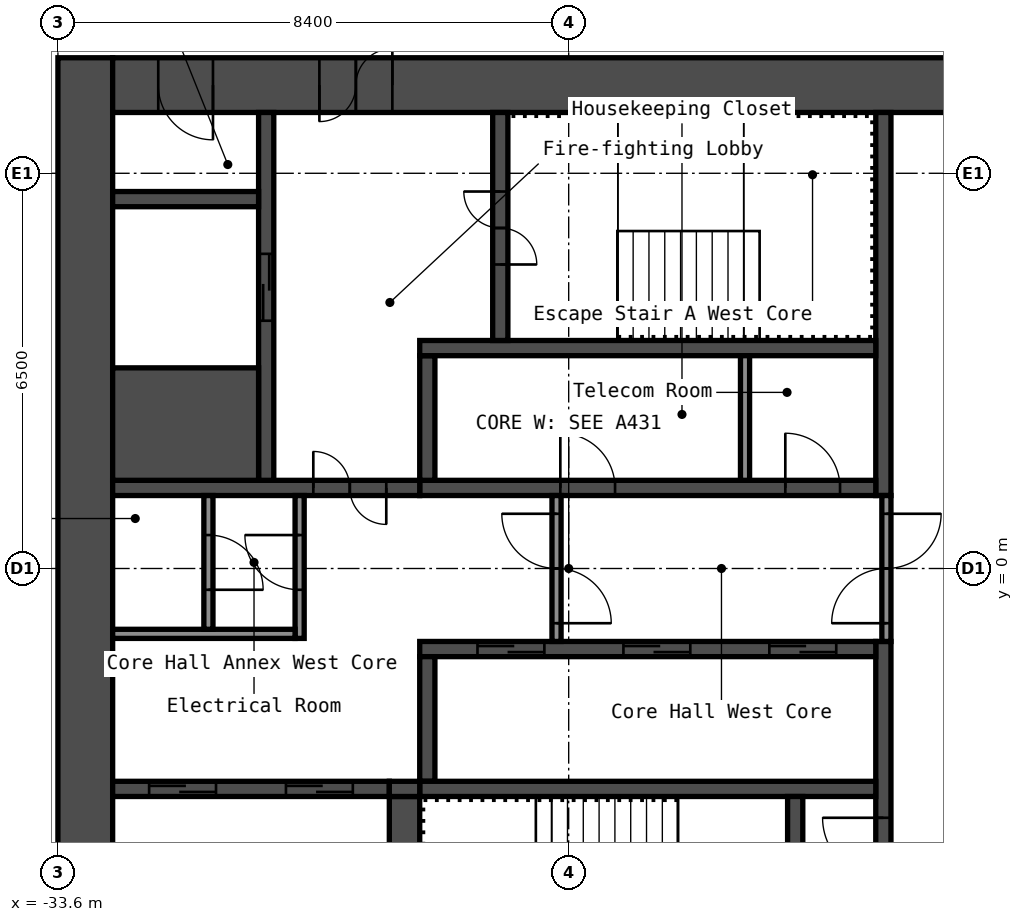
"""IFC4 building model, lengths in metres.
Left out: names, types, materials, properties, quantities, classifications, styles, units other than length and angle.
Written with IfcOpenShell. Run it as: python <this file> out.ifc"""

import sys

from ifc_helpers import new_model, si_unit, direction, frame, frame_2d, origin, place, context, subcontext, project, spatial, rectangle, extrude, element, fill, save


model = new_model("IFC4")
c1 = context("Model", 3, precision=1e-05, world=origin(), true_north=direction((0.0, 1.0)))
c2 = subcontext(c1, "Body", "Model", "MODEL_VIEW")
j1 = project(units=[si_unit("LENGTHUNIT", "METRE"), si_unit("PLANEANGLEUNIT", "RADIAN")], contexts=[c1])
p1 = place(None, origin())
s1 = spatial("IfcSite", under=j1, at=p1, CompositionType="ELEMENT")
p2 = place(p1, origin())
s2 = spatial("IfcBuilding", under=s1, at=p2, CompositionType="ELEMENT")
p3 = place(p2, frame((0.0, 0.0, 221.8)))
s3 = spatial("IfcBuildingStorey", under=s2, at=p3, CompositionType="ELEMENT", Elevation=221.8)
p4 = place(p3, frame((-33.15, -8.4, 0.0), z_axis=(0.0, 0.0, 1.0), x_axis=(0.0, 1.0, 0.0)))
e1 = element("IfcWall", 1, at=p4, inside=s3, PredefinedType="SHEAR", context=c2, shape_type="SweptSolid", body=[
    extrude(rectangle(XDim=16.8, YDim=0.9, at=frame_2d((8.4, 0.0))), origin(), (0.0, 0.0, 1.0), 2.75),
])
p5 = place(p3, frame((-32.7, 7.95, 0.0), z_axis=(0.0, 0.0, 1.0), x_axis=(1.0, 0.0, 0.0)))
e2 = element("IfcWall", 2, at=p5, inside=s3, PredefinedType="SHEAR", context=c2, shape_type="SweptSolid", body=[
    extrude(rectangle(XDim=15.0, YDim=0.9, at=frame_2d((7.5, 0.0))), origin(), (0.0, 0.0, 1.0), 2.75),
])
p6 = place(p5, frame((3.4, 0.0, 0.0)))
e3 = element("IfcOpeningElement", 3, at=p6, cuts=e2, PredefinedType="OPENING", context=c2, shape_type="SweptSolid", body=[
    extrude(rectangle(XDim=1.2, YDim=2.1, at=frame_2d((0.6, 1.05))), frame((0.0, 0.46, 0.0), z_axis=(0.0, -1.0, 0.0), x_axis=(1.0, 0.0, 0.0)), (0.0, 0.0, 1.0), 0.92),
])
p7 = place(p5, frame((0.75, 0.0, 0.0)))
e4 = element("IfcOpeningElement", 4, at=p7, cuts=e2, PredefinedType="OPENING", context=c2, shape_type="SweptSolid", body=[
    extrude(rectangle(XDim=0.9, YDim=2.1, at=frame_2d((0.45, 1.05))), frame((0.0, 0.46, 0.0), z_axis=(0.0, -1.0, 0.0), x_axis=(1.0, 0.0, 0.0)), (0.0, 0.0, 1.0), 0.92),
])
p8 = place(p3, frame((-20.025, 1.2, 0.0), z_axis=(0.0, 0.0, 1.0), x_axis=(0.0, 1.0, 0.0)))
e5 = element("IfcWall", 5, at=p8, inside=s3, PredefinedType="SHEAR", context=c2, shape_type="SweptSolid", body=[
    extrude(rectangle(XDim=6.3, YDim=0.25, at=frame_2d((3.15, 0.0))), origin(), (0.0, 0.0, 1.0), 2.75),
])
p9 = place(p3, frame((-20.025, -7.5, 0.0), z_axis=(0.0, 0.0, 1.0), x_axis=(0.0, 1.0, 0.0)))
e6 = element("IfcWall", 6, at=p9, inside=s3, PredefinedType="SHEAR", context=c2, shape_type="SweptSolid", body=[
    extrude(rectangle(XDim=6.3, YDim=0.25, at=frame_2d((3.15, 0.0))), origin(), (0.0, 0.0, 1.0), 2.75),
])
p10 = place(p9, frame((2.4, 0.0, 0.0)))
e7 = element("IfcOpeningElement", 7, at=p10, cuts=e6, PredefinedType="OPENING", context=c2, shape_type="SweptSolid", body=[
    extrude(rectangle(XDim=1.0, YDim=2.1, at=frame_2d((0.5, 1.05))), frame((0.0, 0.135, 0.0), z_axis=(0.0, -1.0, 0.0), x_axis=(1.0, 0.0, 0.0)), (0.0, 0.0, 1.0), 0.27),
])
p11 = place(p3, frame((-27.65, 1.325, 0.0), z_axis=(0.0, 0.0, 1.0), x_axis=(1.0, 0.0, 0.0)))
e8 = element("IfcWall", 8, at=p11, inside=s3, PredefinedType="SHEAR", context=c2, shape_type="SweptSolid", body=[
    extrude(rectangle(XDim=7.5, YDim=0.25, at=frame_2d((3.75, 0.0))), origin(), (0.0, 0.0, 1.0), 2.75),
])
p12 = place(p11, frame((6.012, 0.0, 0.0)))
e9 = element("IfcOpeningElement", 9, at=p12, cuts=e8, PredefinedType="OPENING", context=c2, shape_type="SweptSolid", body=[
    extrude(rectangle(XDim=0.9, YDim=2.1, at=frame_2d((0.45, 1.05))), frame((0.0, 0.135, 0.0), z_axis=(0.0, -1.0, 0.0), x_axis=(1.0, 0.0, 0.0)), (0.0, 0.0, 1.0), 0.27),
])
p13 = place(p11, frame((2.312, 0.0, 0.0)))
e10 = element("IfcOpeningElement", 10, at=p13, cuts=e8, PredefinedType="OPENING", context=c2, shape_type="SweptSolid", body=[
    extrude(rectangle(XDim=0.9, YDim=2.1, at=frame_2d((0.45, 1.05))), frame((0.0, 0.135, 0.0), z_axis=(0.0, -1.0, 0.0), x_axis=(1.0, 0.0, 0.0)), (0.0, 0.0, 1.0), 0.27),
])
p14 = place(p3, frame((-27.525, 1.45, 0.0), z_axis=(0.0, 0.0, 1.0), x_axis=(0.0, 1.0, 0.0)))
e11 = element("IfcWall", 11, at=p14, inside=s3, PredefinedType="SHEAR", context=c2, shape_type="SweptSolid", body=[
    extrude(rectangle(XDim=2.05, YDim=0.25, at=frame_2d((1.025, 0.0))), origin(), (0.0, 0.0, 1.0), 2.75),
])
p15 = place(p3, frame((-27.65, 3.625, 0.0), z_axis=(0.0, 0.0, 1.0), x_axis=(1.0, 0.0, 0.0)))
e12 = element("IfcWall", 12, at=p15, inside=s3, PredefinedType="SHEAR", context=c2, shape_type="SweptSolid", body=[
    extrude(rectangle(XDim=7.5, YDim=0.25, at=frame_2d((3.75, 0.0))), origin(), (0.0, 0.0, 1.0), 2.75),
])
p16 = place(p3, frame((-26.325, 3.75, 0.0), z_axis=(0.0, 0.0, 1.0), x_axis=(0.0, 1.0, 0.0)))
e13 = element("IfcWall", 13, at=p16, inside=s3, PredefinedType="SHEAR", context=c2, shape_type="SweptSolid", body=[
    extrude(rectangle(XDim=3.75, YDim=0.25, at=frame_2d((1.875, 0.0))), origin(), (0.0, 0.0, 1.0), 2.75),
])
p17 = place(p16, frame((1.25, 0.0, 0.0)))
e14 = element("IfcOpeningElement", 14, at=p17, cuts=e13, PredefinedType="OPENING", context=c2, shape_type="SweptSolid", body=[
    extrude(rectangle(XDim=1.2, YDim=2.1, at=frame_2d((0.6, 1.05))), frame((0.0, 0.135, 0.0), z_axis=(0.0, -1.0, 0.0), x_axis=(1.0, 0.0, 0.0)), (0.0, 0.0, 1.0), 0.27),
])
p18 = place(p3, frame((-32.7, 1.325, 0.0), z_axis=(0.0, 0.0, 1.0), x_axis=(1.0, 0.0, 0.0)))
e15 = element("IfcWall", 15, at=p18, inside=s3, PredefinedType="SHEAR", context=c2, shape_type="SweptSolid", body=[
    extrude(rectangle(XDim=5.05, YDim=0.25, at=frame_2d((2.525, 0.0))), origin(), (0.0, 0.0, 1.0), 2.75),
])
p19 = place(p18, frame((3.3, 0.0, 0.0)))
e16 = element("IfcOpeningElement", 16, at=p19, cuts=e15, PredefinedType="OPENING", context=c2, shape_type="SweptSolid", body=[
    extrude(rectangle(XDim=1.2, YDim=2.1, at=frame_2d((0.6, 1.05))), frame((0.0, 0.135, 0.0), z_axis=(0.0, -1.0, 0.0), x_axis=(1.0, 0.0, 0.0)), (0.0, 0.0, 1.0), 0.27),
])
p20 = place(p3, frame((-30.175, 1.45, 0.0), z_axis=(0.0, 0.0, 1.0), x_axis=(0.0, 1.0, 0.0)))
e17 = element("IfcWall", 17, at=p20, inside=s3, PredefinedType="SHEAR", context=c2, shape_type="SweptSolid", body=[
    extrude(rectangle(XDim=6.05, YDim=0.25, at=frame_2d((3.025, 0.0))), origin(), (0.0, 0.0, 1.0), 2.75),
])
p21 = place(p20, frame((2.625, 0.0, 0.0)))
e18 = element("IfcOpeningElement", 18, at=p21, cuts=e17, PredefinedType="OPENING", context=c2, shape_type="SweptSolid", body=[
    extrude(rectangle(XDim=1.1, YDim=2.1, at=frame_2d((0.55, 1.05))), frame((0.0, 0.135, 0.0), z_axis=(0.0, -1.0, 0.0), x_axis=(1.0, 0.0, 0.0)), (0.0, 0.0, 1.0), 0.27),
])
p22 = place(p3, frame((-32.7, 2.375, 0.0), z_axis=(0.0, 0.0, 1.0), x_axis=(1.0, 0.0, 0.0)))
e19 = element("IfcWall", 19, at=p22, inside=s3, PredefinedType="SHEAR", context=c2, shape_type="SweptSolid", body=[
    extrude(rectangle(XDim=2.4, YDim=1.85, at=frame_2d((1.2, 0.0))), origin(), (0.0, 0.0, 1.0), 2.75),
])
p23 = place(p3, frame((-32.7, 6.075, 0.0), z_axis=(0.0, 0.0, 1.0), x_axis=(1.0, 0.0, 0.0)))
e20 = element("IfcWall", 20, at=p23, inside=s3, PredefinedType="SHEAR", context=c2, shape_type="SweptSolid", body=[
    extrude(rectangle(XDim=2.4, YDim=0.25, at=frame_2d((1.2, 0.0))), origin(), (0.0, 0.0, 1.0), 2.75),
])
p24 = place(p3, frame((-27.65, -1.325, 0.0), z_axis=(0.0, 0.0, 1.0), x_axis=(1.0, 0.0, 0.0)))
e21 = element("IfcWall", 21, at=p24, inside=s3, PredefinedType="SHEAR", context=c2, shape_type="SweptSolid", body=[
    extrude(rectangle(XDim=7.5, YDim=0.25, at=frame_2d((3.75, 0.0))), origin(), (0.0, 0.0, 1.0), 2.75),
])
p25 = place(p24, frame((5.75, 0.0, 0.0)))
e22 = element("IfcOpeningElement", 22, at=p25, cuts=e21, PredefinedType="OPENING", context=c2, shape_type="SweptSolid", body=[
    extrude(rectangle(XDim=1.1, YDim=2.1, at=frame_2d((0.55, 1.05))), frame((0.0, 0.135, 0.0), z_axis=(0.0, -1.0, 0.0), x_axis=(1.0, 0.0, 0.0)), (0.0, 0.0, 1.0), 0.27),
])
p26 = place(p24, frame((3.35, 0.0, 0.0)))
e23 = element("IfcOpeningElement", 23, at=p26, cuts=e21, PredefinedType="OPENING", context=c2, shape_type="SweptSolid", body=[
    extrude(rectangle(XDim=1.1, YDim=2.1, at=frame_2d((0.55, 1.05))), frame((0.0, 0.135, 0.0), z_axis=(0.0, -1.0, 0.0), x_axis=(1.0, 0.0, 0.0)), (0.0, 0.0, 1.0), 0.27),
])
p27 = place(p24, frame((0.95, 0.0, 0.0)))
e24 = element("IfcOpeningElement", 24, at=p27, cuts=e21, PredefinedType="OPENING", context=c2, shape_type="SweptSolid", body=[
    extrude(rectangle(XDim=1.1, YDim=2.1, at=frame_2d((0.55, 1.05))), frame((0.0, 0.135, 0.0), z_axis=(0.0, -1.0, 0.0), x_axis=(1.0, 0.0, 0.0)), (0.0, 0.0, 1.0), 0.27),
])
p28 = place(p3, frame((-27.525, -3.5, 0.0), z_axis=(0.0, 0.0, 1.0), x_axis=(0.0, 1.0, 0.0)))
e25 = element("IfcWall", 25, at=p28, inside=s3, PredefinedType="SHEAR", context=c2, shape_type="SweptSolid", body=[
    extrude(rectangle(XDim=2.05, YDim=0.25, at=frame_2d((1.025, 0.0))), origin(), (0.0, 0.0, 1.0), 2.75),
])
p29 = place(p3, frame((-27.65, -3.625, 0.0), z_axis=(0.0, 0.0, 1.0), x_axis=(1.0, 0.0, 0.0)))
e26 = element("IfcWall", 26, at=p29, inside=s3, PredefinedType="SHEAR", context=c2, shape_type="SweptSolid", body=[
    extrude(rectangle(XDim=7.5, YDim=0.25, at=frame_2d((3.75, 0.0))), origin(), (0.0, 0.0, 1.0), 2.75),
])
p30 = place(p3, frame((-21.475, -7.5, 0.0), z_axis=(0.0, 0.0, 1.0), x_axis=(0.0, 1.0, 0.0)))
e27 = element("IfcWall", 27, at=p30, inside=s3, PredefinedType="SHEAR", context=c2, shape_type="SweptSolid", body=[
    extrude(rectangle(XDim=3.75, YDim=0.25, at=frame_2d((1.875, 0.0))), origin(), (0.0, 0.0, 1.0), 2.75),
])
p31 = place(p30, frame((1.3, 0.0, 0.0)))
e28 = element("IfcOpeningElement", 28, at=p31, cuts=e27, PredefinedType="OPENING", context=c2, shape_type="SweptSolid", body=[
    extrude(rectangle(XDim=1.2, YDim=2.1, at=frame_2d((0.6, 1.05))), frame((0.0, 0.135, 0.0), z_axis=(0.0, -1.0, 0.0), x_axis=(1.0, 0.0, 0.0)), (0.0, 0.0, 1.0), 0.27),
])
p32 = place(p3, frame((-27.9, -7.5, 0.0), z_axis=(0.0, 0.0, 1.0), x_axis=(0.0, 1.0, 0.0)))
e29 = element("IfcWall", 29, at=p32, inside=s3, PredefinedType="SHEAR", context=c2, shape_type="SweptSolid", body=[
    extrude(rectangle(XDim=3.75, YDim=0.5, at=frame_2d((1.875, 0.0))), origin(), (0.0, 0.0, 1.0), 2.75),
])
p33 = place(p3, frame((-32.7, -3.625, 0.0), z_axis=(0.0, 0.0, 1.0), x_axis=(1.0, 0.0, 0.0)))
e30 = element("IfcWall", 30, at=p33, inside=s3, PredefinedType="SHEAR", context=c2, shape_type="SweptSolid", body=[
    extrude(rectangle(XDim=4.55, YDim=0.25, at=frame_2d((2.275, 0.0))), origin(), (0.0, 0.0, 1.0), 2.75),
])
p34 = place(p33, frame((2.85, 0.0, 0.0)))
e31 = element("IfcOpeningElement", 31, at=p34, cuts=e30, PredefinedType="OPENING", context=c2, shape_type="SweptSolid", body=[
    extrude(rectangle(XDim=1.1, YDim=2.1, at=frame_2d((0.55, 1.05))), frame((0.0, 0.135, 0.0), z_axis=(0.0, -1.0, 0.0), x_axis=(1.0, 0.0, 0.0)), (0.0, 0.0, 1.0), 0.27),
])
p35 = place(p33, frame((0.6, 0.0, 0.0)))
e32 = element("IfcOpeningElement", 32, at=p35, cuts=e30, PredefinedType="OPENING", context=c2, shape_type="SweptSolid", body=[
    extrude(rectangle(XDim=1.1, YDim=2.1, at=frame_2d((0.55, 1.05))), frame((0.0, 0.135, 0.0), z_axis=(0.0, -1.0, 0.0), x_axis=(1.0, 0.0, 0.0)), (0.0, 0.0, 1.0), 0.27),
])
p36 = place(p3, frame((-28.15, -3.625, 0.0), z_axis=(0.0, 0.0, 1.0), x_axis=(1.0, 0.0, 0.0)))
e33 = element("IfcWall", 33, at=p36, inside=s3, PredefinedType="SHEAR", context=c2, shape_type="SweptSolid", body=[
    extrude(rectangle(XDim=0.5, YDim=0.25, at=frame_2d((0.25, 0.0))), origin(), (0.0, 0.0, 1.0), 2.75),
])
p37 = place(p3, frame((-19.975, -1.2, 0.0), z_axis=(0.0, 0.0, 1.0), x_axis=(0.0, 1.0, 0.0)))
e34 = element("IfcWall", 34, at=p37, inside=s3, PredefinedType="PARTITIONING", context=c2, shape_type="SweptSolid", body=[
    extrude(rectangle(XDim=2.4, YDim=0.15, at=frame_2d((1.2, 0.0))), origin(), (0.0, 0.0, 1.0), 2.75),
])
p38 = place(p37, frame((0.3, 0.0, 0.0)))
e35 = element("IfcOpeningElement", 35, at=p38, cuts=e34, PredefinedType="OPENING", context=c2, shape_type="SweptSolid", body=[
    extrude(rectangle(XDim=1.8, YDim=2.1, at=frame_2d((0.9, 1.05))), frame((0.0, 0.085, 0.0), z_axis=(0.0, -1.0, 0.0), x_axis=(1.0, 0.0, 0.0)), (0.0, 0.0, 1.0), 0.17),
])
p39 = place(p3, frame((-25.4, -1.2, 0.0), z_axis=(0.0, 0.0, 1.0), x_axis=(0.0, 1.0, 0.0)))
e36 = element("IfcWall", 36, at=p39, inside=s3, PredefinedType="PARTITIONING", context=c2, shape_type="SweptSolid", body=[
    extrude(rectangle(XDim=2.4, YDim=0.15, at=frame_2d((1.2, 0.0))), origin(), (0.0, 0.0, 1.0), 2.75),
])
p40 = place(p39, frame((0.3, 0.0, 0.0)))
e37 = element("IfcOpeningElement", 37, at=p40, cuts=e36, PredefinedType="OPENING", context=c2, shape_type="SweptSolid", body=[
    extrude(rectangle(XDim=1.8, YDim=2.1, at=frame_2d((0.9, 1.05))), frame((0.0, 0.085, 0.0), z_axis=(0.0, -1.0, 0.0), x_axis=(1.0, 0.0, 0.0)), (0.0, 0.0, 1.0), 0.17),
])
p41 = place(p3, frame((-29.625, -1.15, 0.0), z_axis=(0.0, 0.0, 1.0), x_axis=(0.0, 1.0, 0.0)))
e38 = element("IfcWall", 38, at=p41, inside=s3, PredefinedType="PARTITIONING", context=c2, shape_type="SweptSolid", body=[
    extrude(rectangle(XDim=2.35, YDim=0.15, at=frame_2d((1.175, 0.0))), origin(), (0.0, 0.0, 1.0), 2.75),
])
p42 = place(p41, frame((0.8, 0.0, 0.0)))
e39 = element("IfcOpeningElement", 39, at=p42, cuts=e38, PredefinedType="OPENING", context=c2, shape_type="SweptSolid", body=[
    extrude(rectangle(XDim=0.9, YDim=2.1, at=frame_2d((0.45, 1.05))), frame((0.0, 0.085, 0.0), z_axis=(0.0, -1.0, 0.0), x_axis=(1.0, 0.0, 0.0)), (0.0, 0.0, 1.0), 0.17),
])
p43 = place(p3, frame((-32.7, -1.075, 0.0), z_axis=(0.0, 0.0, 1.0), x_axis=(1.0, 0.0, 0.0)))
e40 = element("IfcWall", 40, at=p43, inside=s3, PredefinedType="PARTITIONING", context=c2, shape_type="SweptSolid", body=[
    extrude(rectangle(XDim=3.0, YDim=0.15, at=frame_2d((1.5, 0.0))), origin(), (0.0, 0.0, 1.0), 2.75),
])
p44 = place(p3, frame((-31.125, -1.0, 0.0), z_axis=(0.0, 0.0, 1.0), x_axis=(0.0, 1.0, 0.0)))
e41 = element("IfcWall", 41, at=p44, inside=s3, PredefinedType="PARTITIONING", context=c2, shape_type="SweptSolid", body=[
    extrude(rectangle(XDim=2.2, YDim=0.15, at=frame_2d((1.1, 0.0))), origin(), (0.0, 0.0, 1.0), 2.75),
])
p45 = place(p44, frame((0.65, 0.0, 0.0)))
e42 = element("IfcOpeningElement", 42, at=p45, cuts=e41, PredefinedType="OPENING", context=c2, shape_type="SweptSolid", body=[
    extrude(rectangle(XDim=0.9, YDim=2.1, at=frame_2d((0.45, 1.05))), frame((0.0, 0.085, 0.0), z_axis=(0.0, -1.0, 0.0), x_axis=(1.0, 0.0, 0.0)), (0.0, 0.0, 1.0), 0.17),
])
p46 = place(p3, frame((-22.3, 1.45, 0.0), z_axis=(0.0, 0.0, 1.0), x_axis=(0.0, 1.0, 0.0)))
e43 = element("IfcWall", 43, at=p46, inside=s3, PredefinedType="PARTITIONING", context=c2, shape_type="SweptSolid", body=[
    extrude(rectangle(XDim=2.05, YDim=0.15, at=frame_2d((1.025, 0.0))), origin(), (0.0, 0.0, 1.0), 2.75),
])
p47 = place(p6, origin())
e44 = element("IfcDoor", 44, at=p47, inside=s3, OperationType="DOUBLE_DOOR_SINGLE_SWING", PredefinedType="DOOR", context=c2, shape_type="SweptSolid", body=[
    extrude(rectangle(XDim=1.2, YDim=2.1, at=frame_2d((0.6, 1.05))), frame((0.0, 0.025, 0.0), z_axis=(0.0, -1.0, 0.0), x_axis=(1.0, 0.0, 0.0)), (0.0, 0.0, 1.0), 0.05),
])
fill(e3, e44)
p48 = place(p7, origin())
e45 = element("IfcDoor", 45, at=p48, inside=s3, OperationType="SINGLE_SWING_RIGHT", PredefinedType="DOOR", context=c2, shape_type="SweptSolid", body=[
    extrude(rectangle(XDim=0.9, YDim=2.1, at=frame_2d((0.45, 1.05))), frame((0.0, 0.025, 0.0), z_axis=(0.0, -1.0, 0.0), x_axis=(1.0, 0.0, 0.0)), (0.0, 0.0, 1.0), 0.05),
])
fill(e4, e45)
p49 = place(p17, origin())
e46 = element("IfcDoor", 46, at=p49, inside=s3, OperationType="DOUBLE_DOOR_SINGLE_SWING", PredefinedType="DOOR", context=c2, shape_type="SweptSolid", body=[
    extrude(rectangle(XDim=1.2, YDim=2.1, at=frame_2d((0.6, 1.05))), frame((0.0, 0.025, 0.0), z_axis=(0.0, -1.0, 0.0), x_axis=(1.0, 0.0, 0.0)), (0.0, 0.0, 1.0), 0.05),
])
fill(e14, e46)
p50 = place(p10, origin())
e47 = element("IfcDoor", 47, at=p50, inside=s3, OperationType="SINGLE_SWING_LEFT", PredefinedType="DOOR", context=c2, shape_type="SweptSolid", body=[
    extrude(rectangle(XDim=1.0, YDim=2.1, at=frame_2d((0.5, 1.05))), frame((0.0, 0.025, 0.0), z_axis=(0.0, -1.0, 0.0), x_axis=(1.0, 0.0, 0.0)), (0.0, 0.0, 1.0), 0.05),
])
fill(e7, e47)
p51 = place(p19, origin())
e48 = element("IfcDoor", 48, at=p51, inside=s3, OperationType="DOUBLE_DOOR_SINGLE_SWING", PredefinedType="DOOR", context=c2, shape_type="SweptSolid", body=[
    extrude(rectangle(XDim=1.2, YDim=2.1, at=frame_2d((0.6, 1.05))), frame((0.0, 0.025, 0.0), z_axis=(0.0, -1.0, 0.0), x_axis=(1.0, 0.0, 0.0)), (0.0, 0.0, 1.0), 0.05),
])
fill(e16, e48)
p52 = place(p38, origin())
e49 = element("IfcDoor", 49, at=p52, inside=s3, OperationType="DOUBLE_DOOR_SINGLE_SWING", PredefinedType="DOOR", context=c2, shape_type="SweptSolid", body=[
    extrude(rectangle(XDim=1.8, YDim=2.1, at=frame_2d((0.9, 1.05))), frame((0.0, 0.025, 0.0), z_axis=(0.0, -1.0, 0.0), x_axis=(1.0, 0.0, 0.0)), (0.0, 0.0, 1.0), 0.05),
])
fill(e35, e49)
p53 = place(p40, origin())
e50 = element("IfcDoor", 50, at=p53, inside=s3, OperationType="DOUBLE_DOOR_SINGLE_SWING", PredefinedType="DOOR", context=c2, shape_type="SweptSolid", body=[
    extrude(rectangle(XDim=1.8, YDim=2.1, at=frame_2d((0.9, 1.05))), frame((0.0, 0.025, 0.0), z_axis=(0.0, -1.0, 0.0), x_axis=(1.0, 0.0, 0.0)), (0.0, 0.0, 1.0), 0.05),
])
fill(e37, e50)
p54 = place(p42, origin())
e51 = element("IfcDoor", 51, at=p54, inside=s3, OperationType="SINGLE_SWING_LEFT", PredefinedType="DOOR", context=c2, shape_type="SweptSolid", body=[
    extrude(rectangle(XDim=0.9, YDim=2.1, at=frame_2d((0.45, 1.05))), frame((0.0, 0.025, 0.0), z_axis=(0.0, -1.0, 0.0), x_axis=(1.0, 0.0, 0.0)), (0.0, 0.0, 1.0), 0.05),
])
fill(e39, e51)
p55 = place(p45, origin())
e52 = element("IfcDoor", 52, at=p55, inside=s3, OperationType="SINGLE_SWING_LEFT", PredefinedType="DOOR", context=c2, shape_type="SweptSolid", body=[
    extrude(rectangle(XDim=0.9, YDim=2.1, at=frame_2d((0.45, 1.05))), frame((0.0, 0.025, 0.0), z_axis=(0.0, -1.0, 0.0), x_axis=(1.0, 0.0, 0.0)), (0.0, 0.0, 1.0), 0.05),
])
fill(e42, e52)
p56 = place(p12, origin())
e53 = element("IfcDoor", 53, at=p56, inside=s3, OperationType="SINGLE_SWING_RIGHT", PredefinedType="DOOR", context=c2, shape_type="SweptSolid", body=[
    extrude(rectangle(XDim=0.9, YDim=2.1, at=frame_2d((0.45, 1.05))), frame((0.0, 0.025, 0.0), z_axis=(0.0, -1.0, 0.0), x_axis=(1.0, 0.0, 0.0)), (0.0, 0.0, 1.0), 0.05),
])
fill(e9, e53)
p57 = place(p13, origin())
e54 = element("IfcDoor", 54, at=p57, inside=s3, OperationType="SINGLE_SWING_RIGHT", PredefinedType="DOOR", context=c2, shape_type="SweptSolid", body=[
    extrude(rectangle(XDim=0.9, YDim=2.1, at=frame_2d((0.45, 1.05))), frame((0.0, 0.025, 0.0), z_axis=(0.0, -1.0, 0.0), x_axis=(1.0, 0.0, 0.0)), (0.0, 0.0, 1.0), 0.05),
])
fill(e10, e54)
p58 = place(p25, origin())
e55 = element("IfcDoor", 55, at=p58, inside=s3, OperationType="DOUBLE_DOOR_SLIDING", PredefinedType="DOOR", context=c2, shape_type="SweptSolid", body=[
    extrude(rectangle(XDim=1.1, YDim=2.1, at=frame_2d((0.55, 1.05))), frame((0.0, 0.025, 0.0), z_axis=(0.0, -1.0, 0.0), x_axis=(1.0, 0.0, 0.0)), (0.0, 0.0, 1.0), 0.05),
])
fill(e22, e55)
p59 = place(p26, origin())
e56 = element("IfcDoor", 56, at=p59, inside=s3, OperationType="DOUBLE_DOOR_SLIDING", PredefinedType="DOOR", context=c2, shape_type="SweptSolid", body=[
    extrude(rectangle(XDim=1.1, YDim=2.1, at=frame_2d((0.55, 1.05))), frame((0.0, 0.025, 0.0), z_axis=(0.0, -1.0, 0.0), x_axis=(1.0, 0.0, 0.0)), (0.0, 0.0, 1.0), 0.05),
])
fill(e23, e56)
p60 = place(p27, origin())
e57 = element("IfcDoor", 57, at=p60, inside=s3, OperationType="DOUBLE_DOOR_SLIDING", PredefinedType="DOOR", context=c2, shape_type="SweptSolid", body=[
    extrude(rectangle(XDim=1.1, YDim=2.1, at=frame_2d((0.55, 1.05))), frame((0.0, 0.025, 0.0), z_axis=(0.0, -1.0, 0.0), x_axis=(1.0, 0.0, 0.0)), (0.0, 0.0, 1.0), 0.05),
])
fill(e24, e57)
p61 = place(p21, origin())
e58 = element("IfcDoor", 58, at=p61, inside=s3, OperationType="DOUBLE_DOOR_SLIDING", PredefinedType="DOOR", context=c2, shape_type="SweptSolid", body=[
    extrude(rectangle(XDim=1.1, YDim=2.1, at=frame_2d((0.55, 1.05))), frame((0.0, 0.025, 0.0), z_axis=(0.0, -1.0, 0.0), x_axis=(1.0, 0.0, 0.0)), (0.0, 0.0, 1.0), 0.05),
])
fill(e18, e58)
p62 = place(p34, origin())
e59 = element("IfcDoor", 59, at=p62, inside=s3, OperationType="DOUBLE_DOOR_SLIDING", PredefinedType="DOOR", context=c2, shape_type="SweptSolid", body=[
    extrude(rectangle(XDim=1.1, YDim=2.1, at=frame_2d((0.55, 1.05))), frame((0.0, 0.025, 0.0), z_axis=(0.0, -1.0, 0.0), x_axis=(1.0, 0.0, 0.0)), (0.0, 0.0, 1.0), 0.05),
])
fill(e31, e59)
p63 = place(p35, origin())
e60 = element("IfcDoor", 60, at=p63, inside=s3, OperationType="DOUBLE_DOOR_SLIDING", PredefinedType="DOOR", context=c2, shape_type="SweptSolid", body=[
    extrude(rectangle(XDim=1.1, YDim=2.1, at=frame_2d((0.55, 1.05))), frame((0.0, 0.025, 0.0), z_axis=(0.0, -1.0, 0.0), x_axis=(1.0, 0.0, 0.0)), (0.0, 0.0, 1.0), 0.05),
])
fill(e32, e60)
save(model, sys.argv[1])
